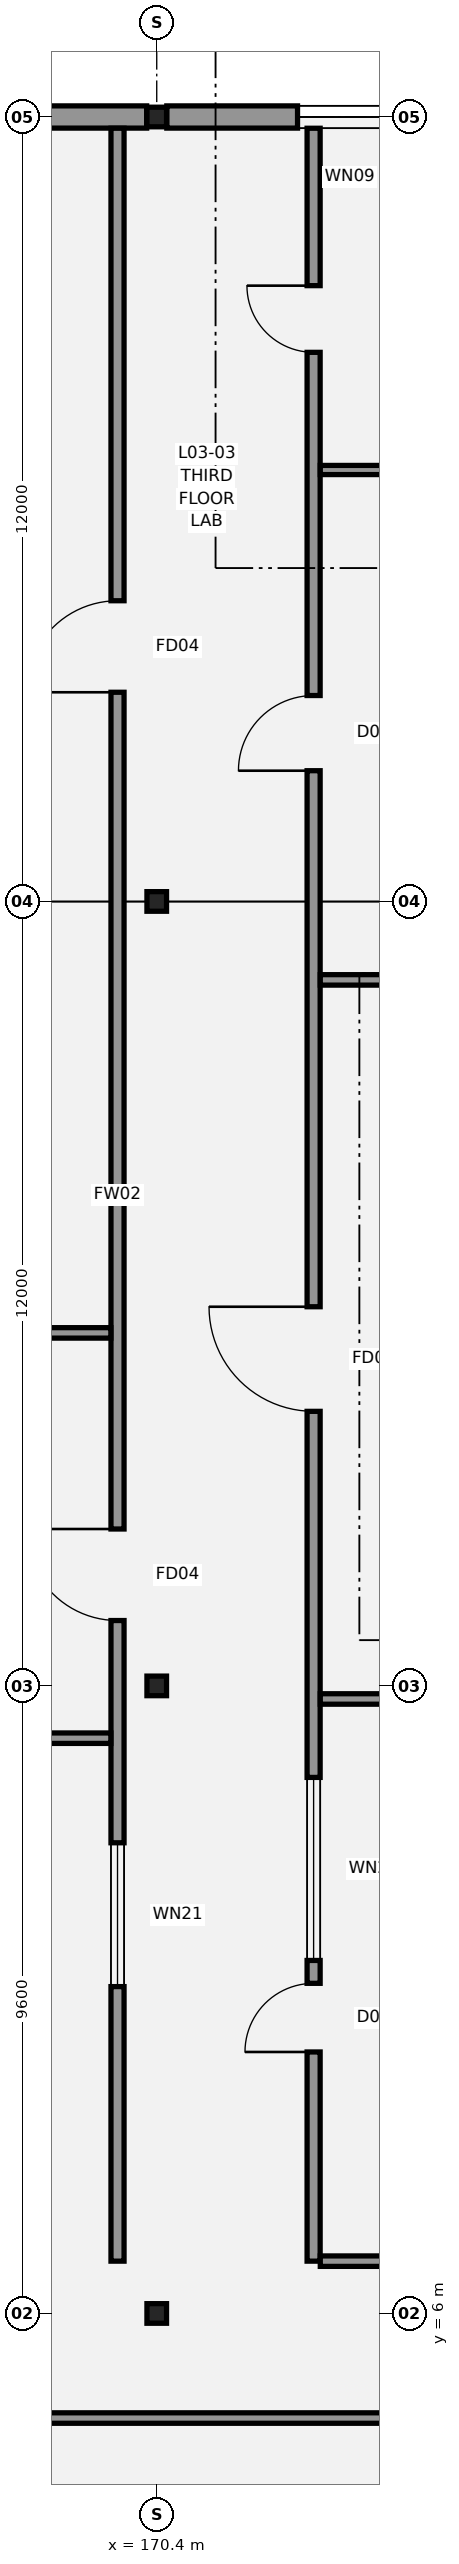
"""IFC4 building model, lengths in metres.
Left out: names, types, materials, properties, quantities, classifications, styles, units other than length and angle.
Written with IfcOpenShell. Run it as: python <this file> out.ifc"""

import sys

from ifc_helpers import new_model, si_unit, direction, frame, frame_2d, origin, origin_2d, place, context, subcontext, project, spatial, rectangle, i_section, extrude, element, fill, save


model = new_model("IFC4")
c1 = context("Model", 3, precision=1e-05, world=origin(), true_north=direction((0.0, 1.0)))
c2 = subcontext(c1, "Body", "Model", "MODEL_VIEW")
j1 = project(units=[si_unit("LENGTHUNIT", "METRE"), si_unit("PLANEANGLEUNIT", "RADIAN")], contexts=[c1])
p1 = place(None, origin())
s1 = spatial("IfcSite", under=j1, at=p1, CompositionType="ELEMENT")
p2 = place(p1, origin())
s2 = spatial("IfcBuilding", under=s1, at=p2, CompositionType="ELEMENT")
p3 = place(p2, frame((0.0, 0.0, 14.4)))
s3 = spatial("IfcBuildingStorey", under=s2, at=p3, CompositionType="ELEMENT", Elevation=14.4)
for number, where, z_axis, x_axis in (
    (1, (170.4, 6.0, 0.0), (0.0, 0.0, 1.0), (1.0, 0.0, 0.0)),
    (2, (170.4, 15.6, 0.0), (0.0, 0.0, 1.0), (1.0, 0.0, 0.0)),
    (3, (170.4, 27.6, 0.0), (0.0, 0.0, 1.0), (1.0, 0.0, 0.0)),
    (4, (170.4, 39.6, 0.0), (0.0, 0.0, 1.0), (1.0, 0.0, 0.0)),
):
    element("IfcColumn", number, at=place(p3, frame(where, z_axis=z_axis, x_axis=x_axis)), inside=s3, PredefinedType="COLUMN", context=c2, shape_type="SweptSolid", body=[
        extrude(i_section(OverallWidth=0.3, OverallDepth=0.3, WebThickness=0.011, FlangeThickness=0.019, FilletRadius=0.027, at=origin_2d()), origin(), (0.0, 0.0, 1.0), 4.2),
    ])
p4 = place(p3, frame((159.754, 39.6, 0.0), z_axis=(0.0, 0.0, 1.0), x_axis=(1.0, 0.0, 0.0)))
e5 = element("IfcWall", 5, at=p4, inside=s3, PredefinedType="STANDARD", context=c2, shape_type="SweptSolid", body=[
    extrude(rectangle(XDim=10.492, YDim=0.34, at=frame_2d((5.246, 0.0))), origin(), (0.0, 0.0, 1.0), 3.625),
])
p5 = place(p4, frame((3.4, 0.0, 0.8)))
e6 = element("IfcOpeningElement", 6, at=p5, cuts=e5, PredefinedType="OPENING", context=c2, shape_type="SweptSolid", body=[
    extrude(rectangle(XDim=1.2, YDim=2.0, at=frame_2d((0.6, 1.0))), frame((0.0, 0.18, 0.0), z_axis=(0.0, -1.0, 0.0), x_axis=(1.0, 0.0, 0.0)), (0.0, 0.0, 1.0), 0.36),
])
p6 = place(p3, frame((170.554, 39.6, 0.0), z_axis=(0.0, 0.0, 1.0), x_axis=(1.0, 0.0, 0.0)))
e7 = element("IfcWall", 7, at=p6, inside=s3, PredefinedType="STANDARD", context=c2, shape_type="SweptSolid", body=[
    extrude(rectangle(XDim=10.492, YDim=0.34, at=frame_2d((5.246, 0.0))), origin(), (0.0, 0.0, 1.0), 3.625),
])
p7 = place(p6, frame((2.0, 0.0, 0.8)))
e8 = element("IfcOpeningElement", 8, at=p7, cuts=e7, PredefinedType="OPENING", context=c2, shape_type="SweptSolid", body=[
    extrude(rectangle(XDim=1.6, YDim=2.0, at=frame_2d((0.8, 1.0))), frame((0.0, 0.18, 0.0), z_axis=(0.0, -1.0, 0.0), x_axis=(1.0, 0.0, 0.0)), (0.0, 0.0, 1.0), 0.36),
])
p8 = place(p3, frame((159.682, 4.4, 0.0), z_axis=(0.0, 0.0, 1.0), x_axis=(1.0, 0.0, 0.0)))
e9 = element("IfcWall", 9, at=p8, inside=s3, PredefinedType="PARTITIONING", context=c2, shape_type="SweptSolid", body=[
    extrude(rectangle(XDim=32.126, YDim=0.16, at=frame_2d((16.063, 0.0))), origin(), (0.0, 0.0, 1.0), 3.84),
])
p9 = place(p8, frame((16.0, 0.0, 0.0)))
e10 = element("IfcOpeningElement", 10, at=p9, cuts=e9, PredefinedType="OPENING", context=c2, shape_type="SweptSolid", body=[
    extrude(rectangle(XDim=1.15, YDim=2.15, at=frame_2d((0.575, 1.075))), frame((0.0, 0.09, 0.0), z_axis=(0.0, -1.0, 0.0), x_axis=(1.0, 0.0, 0.0)), (0.0, 0.0, 1.0), 0.18),
])
p10 = place(p3, frame((169.8, 6.8, 0.0), z_axis=(0.0, 0.0, 1.0), x_axis=(0.0, 1.0, 0.0)))
e11 = element("IfcWall", 11, at=p10, inside=s3, PredefinedType="PARTITIONING", context=c2, shape_type="SweptSolid", body=[
    extrude(rectangle(XDim=32.628, YDim=0.2, at=frame_2d((16.314, 0.0))), origin(), (0.0, 0.0, 1.0), 3.84),
])
p11 = place(p10, frame((9.8, 0.0, 0.0)))
e12 = element("IfcOpeningElement", 12, at=p11, cuts=e11, PredefinedType="OPENING", context=c2, shape_type="SweptSolid", body=[
    extrude(rectangle(XDim=1.4, YDim=2.2, at=frame_2d((0.7, 1.1))), frame((0.0, 0.11, 0.0), z_axis=(0.0, -1.0, 0.0), x_axis=(1.0, 0.0, 0.0)), (0.0, 0.0, 1.0), 0.22),
])
p12 = place(p10, frame((24.0, 0.0, 0.0)))
e13 = element("IfcOpeningElement", 13, at=p12, cuts=e11, PredefinedType="OPENING", context=c2, shape_type="SweptSolid", body=[
    extrude(rectangle(XDim=1.4, YDim=2.2, at=frame_2d((0.7, 1.1))), frame((0.0, 0.11, 0.0), z_axis=(0.0, -1.0, 0.0), x_axis=(1.0, 0.0, 0.0)), (0.0, 0.0, 1.0), 0.22),
])
p13 = place(p10, frame((4.2, 0.0, 1.05)))
e14 = element("IfcOpeningElement", 14, at=p13, cuts=e11, PredefinedType="OPENING", context=c2, shape_type="SweptSolid", body=[
    extrude(rectangle(XDim=2.2, YDim=1.3, at=frame_2d((1.1, 0.65))), frame((0.0, 0.11, 0.0), z_axis=(0.0, -1.0, 0.0), x_axis=(1.0, 0.0, 0.0)), (0.0, 0.0, 1.0), 0.22),
])
p14 = place(p3, frame((165.552, 14.8, 0.0), z_axis=(0.0, 0.0, 1.0), x_axis=(1.0, 0.0, 0.0)))
e15 = element("IfcWall", 15, at=p14, inside=s3, PredefinedType="PARTITIONING", context=c2, shape_type="SweptSolid", body=[
    extrude(rectangle(XDim=4.146, YDim=0.16, at=frame_2d((2.073, 0.0))), origin(), (0.0, 0.0, 1.0), 3.84),
])
p15 = place(p3, frame((159.772, 21.0, 0.0), z_axis=(0.0, 0.0, 1.0), x_axis=(1.0, 0.0, 0.0)))
e16 = element("IfcWall", 16, at=p15, inside=s3, PredefinedType="PARTITIONING", context=c2, shape_type="SweptSolid", body=[
    extrude(rectangle(XDim=9.926, YDim=0.16, at=frame_2d((4.963, 0.0))), origin(), (0.0, 0.0, 1.0), 3.84),
])
p16 = place(p3, frame((172.8, 6.8, 0.0), z_axis=(0.0, 0.0, 1.0), x_axis=(0.0, 1.0, 0.0)))
e17 = element("IfcWall", 17, at=p16, inside=s3, PredefinedType="PARTITIONING", context=c2, shape_type="SweptSolid", body=[
    extrude(rectangle(XDim=32.628, YDim=0.2, at=frame_2d((16.314, 0.0))), origin(), (0.0, 0.0, 1.0), 3.84),
])
p17 = place(p16, frame((3.2, 0.0, 0.0)))
e18 = element("IfcOpeningElement", 18, at=p17, cuts=e17, PredefinedType="OPENING", context=c2, shape_type="SweptSolid", body=[
    extrude(rectangle(XDim=1.05, YDim=2.15, at=frame_2d((0.525, 1.075))), frame((0.0, 0.11, 0.0), z_axis=(0.0, -1.0, 0.0), x_axis=(1.0, 0.0, 0.0)), (0.0, 0.0, 1.0), 0.22),
])
p18 = place(p16, frame((13.0, 0.0, 0.0)))
e19 = element("IfcOpeningElement", 19, at=p18, cuts=e17, PredefinedType="OPENING", context=c2, shape_type="SweptSolid", body=[
    extrude(rectangle(XDim=1.6, YDim=2.2, at=frame_2d((0.8, 1.1))), frame((0.0, 0.11, 0.0), z_axis=(0.0, -1.0, 0.0), x_axis=(1.0, 0.0, 0.0)), (0.0, 0.0, 1.0), 0.22),
])
p19 = place(p16, frame((22.8, 0.0, 0.0)))
e20 = element("IfcOpeningElement", 20, at=p19, cuts=e17, PredefinedType="OPENING", context=c2, shape_type="SweptSolid", body=[
    extrude(rectangle(XDim=1.15, YDim=2.15, at=frame_2d((0.575, 1.075))), frame((0.0, 0.11, 0.0), z_axis=(0.0, -1.0, 0.0), x_axis=(1.0, 0.0, 0.0)), (0.0, 0.0, 1.0), 0.22),
])
p20 = place(p16, frame((29.2, 0.0, 0.0)))
e21 = element("IfcOpeningElement", 21, at=p20, cuts=e17, PredefinedType="OPENING", context=c2, shape_type="SweptSolid", body=[
    extrude(rectangle(XDim=1.02, YDim=2.12, at=frame_2d((0.51, 1.06))), frame((0.0, 0.11, 0.0), z_axis=(0.0, -1.0, 0.0), x_axis=(1.0, 0.0, 0.0)), (0.0, 0.0, 1.0), 0.22),
])
p21 = place(p16, frame((4.6, 0.0, 1.05)))
e22 = element("IfcOpeningElement", 22, at=p21, cuts=e17, PredefinedType="OPENING", context=c2, shape_type="SweptSolid", body=[
    extrude(rectangle(XDim=2.8, YDim=1.3, at=frame_2d((1.4, 0.65))), frame((0.0, 0.11, 0.0), z_axis=(0.0, -1.0, 0.0), x_axis=(1.0, 0.0, 0.0)), (0.0, 0.0, 1.0), 0.22),
])
p22 = place(p3, frame((172.902, 6.8, 0.0), z_axis=(0.0, 0.0, 1.0), x_axis=(1.0, 0.0, 0.0)))
e23 = element("IfcWall", 23, at=p22, inside=s3, PredefinedType="PARTITIONING", context=c2, shape_type="SweptSolid", body=[
    extrude(rectangle(XDim=10.346, YDim=0.16, at=frame_2d((5.173, 0.0))), origin(), (0.0, 0.0, 1.0), 3.84),
])
p23 = place(p3, frame((172.902, 15.4, 0.0), z_axis=(0.0, 0.0, 1.0), x_axis=(1.0, 0.0, 0.0)))
e24 = element("IfcWall", 24, at=p23, inside=s3, PredefinedType="PARTITIONING", context=c2, shape_type="SweptSolid", body=[
    extrude(rectangle(XDim=18.798, YDim=0.16, at=frame_2d((9.399, 0.0))), origin(), (0.0, 0.0, 1.0), 3.535),
])
p24 = place(p3, frame((172.902, 26.4, 0.0), z_axis=(0.0, 0.0, 1.0), x_axis=(1.0, 0.0, 0.0)))
e25 = element("IfcWall", 25, at=p24, inside=s3, PredefinedType="PARTITIONING", context=c2, shape_type="SweptSolid", body=[
    extrude(rectangle(XDim=18.906, YDim=0.16, at=frame_2d((9.453, 0.0))), origin(), (0.0, 0.0, 1.0), 3.84),
])
p25 = place(p3, frame((172.902, 34.2, 0.0), z_axis=(0.0, 0.0, 1.0), x_axis=(1.0, 0.0, 0.0)))
e26 = element("IfcWall", 26, at=p25, inside=s3, PredefinedType="PARTITIONING", context=c2, shape_type="SweptSolid", body=[
    extrude(rectangle(XDim=18.906, YDim=0.14, at=frame_2d((9.453, 0.0))), origin(), (0.0, 0.0, 1.0), 3.84),
])
p26 = place(p25, frame((10.0, 0.0, 0.0)))
e27 = element("IfcOpeningElement", 27, at=p26, cuts=e26, PredefinedType="OPENING", context=c2, shape_type="SweptSolid", body=[
    extrude(rectangle(XDim=0.95, YDim=2.1, at=frame_2d((0.475, 1.05))), frame((0.0, 0.08, 0.0), z_axis=(0.0, -1.0, 0.0), x_axis=(1.0, 0.0, 0.0)), (0.0, 0.0, 1.0), 0.16),
])
p27 = place(p7, origin())
e28 = element("IfcWindow", 28, at=p27, inside=s3, PartitioningType="SINGLE_PANEL", PredefinedType="WINDOW", context=c2, shape_type="SweptSolid", body=[
    extrude(rectangle(XDim=1.6, YDim=2.0, at=frame_2d((0.8, 1.0))), frame((0.0, 0.03, 0.0), z_axis=(0.0, -1.0, 0.0), x_axis=(1.0, 0.0, 0.0)), (0.0, 0.0, 1.0), 0.06),
])
fill(e8, e28)
p28 = place(p11, origin())
e29 = element("IfcDoor", 29, at=p28, inside=s3, OperationType="SINGLE_SWING_RIGHT", PredefinedType="DOOR", context=c2, shape_type="SweptSolid", body=[
    extrude(rectangle(XDim=1.4, YDim=2.2, at=frame_2d((0.7, 1.1))), frame((0.0, 0.025, 0.0), z_axis=(0.0, -1.0, 0.0), x_axis=(1.0, 0.0, 0.0)), (0.0, 0.0, 1.0), 0.05),
])
fill(e12, e29)
p29 = place(p12, origin())
e30 = element("IfcDoor", 30, at=p29, inside=s3, OperationType="SINGLE_SWING_LEFT", PredefinedType="DOOR", context=c2, shape_type="SweptSolid", body=[
    extrude(rectangle(XDim=1.4, YDim=2.2, at=frame_2d((0.7, 1.1))), frame((0.0, 0.025, 0.0), z_axis=(0.0, -1.0, 0.0), x_axis=(1.0, 0.0, 0.0)), (0.0, 0.0, 1.0), 0.05),
])
fill(e13, e30)
p30 = place(p17, origin())
e31 = element("IfcDoor", 31, at=p30, inside=s3, OperationType="SINGLE_SWING_LEFT", PredefinedType="DOOR", context=c2, shape_type="SweptSolid", body=[
    extrude(rectangle(XDim=1.05, YDim=2.15, at=frame_2d((0.525, 1.075))), frame((0.0, 0.025, 0.0), z_axis=(0.0, -1.0, 0.0), x_axis=(1.0, 0.0, 0.0)), (0.0, 0.0, 1.0), 0.05),
])
fill(e18, e31)
p31 = place(p18, origin())
e32 = element("IfcDoor", 32, at=p31, inside=s3, OperationType="SINGLE_SWING_RIGHT", PredefinedType="DOOR", context=c2, shape_type="SweptSolid", body=[
    extrude(rectangle(XDim=1.6, YDim=2.2, at=frame_2d((0.8, 1.1))), frame((0.0, 0.025, 0.0), z_axis=(0.0, -1.0, 0.0), x_axis=(1.0, 0.0, 0.0)), (0.0, 0.0, 1.0), 0.05),
])
fill(e19, e32)
p32 = place(p19, origin())
e33 = element("IfcDoor", 33, at=p32, inside=s3, OperationType="SINGLE_SWING_LEFT", PredefinedType="DOOR", context=c2, shape_type="SweptSolid", body=[
    extrude(rectangle(XDim=1.15, YDim=2.15, at=frame_2d((0.575, 1.075))), frame((0.0, 0.025, 0.0), z_axis=(0.0, -1.0, 0.0), x_axis=(1.0, 0.0, 0.0)), (0.0, 0.0, 1.0), 0.05),
])
fill(e20, e33)
p33 = place(p20, origin())
e34 = element("IfcDoor", 34, at=p33, inside=s3, OperationType="SINGLE_SWING_RIGHT", PredefinedType="DOOR", context=c2, shape_type="SweptSolid", body=[
    extrude(rectangle(XDim=1.02, YDim=2.12, at=frame_2d((0.51, 1.06))), frame((0.0, 0.025, 0.0), z_axis=(0.0, -1.0, 0.0), x_axis=(1.0, 0.0, 0.0)), (0.0, 0.0, 1.0), 0.05),
])
fill(e21, e34)
p34 = place(p13, origin())
e35 = element("IfcWindow", 35, at=p34, inside=s3, PartitioningType="SINGLE_PANEL", PredefinedType="WINDOW", context=c2, shape_type="SweptSolid", body=[
    extrude(rectangle(XDim=2.2, YDim=1.3, at=frame_2d((1.1, 0.65))), frame((0.0, 0.03, 0.0), z_axis=(0.0, -1.0, 0.0), x_axis=(1.0, 0.0, 0.0)), (0.0, 0.0, 1.0), 0.06),
])
fill(e14, e35)
p35 = place(p21, origin())
e36 = element("IfcWindow", 36, at=p35, inside=s3, PartitioningType="SINGLE_PANEL", PredefinedType="WINDOW", context=c2, shape_type="SweptSolid", body=[
    extrude(rectangle(XDim=2.8, YDim=1.3, at=frame_2d((1.4, 0.65))), frame((0.0, 0.03, 0.0), z_axis=(0.0, -1.0, 0.0), x_axis=(1.0, 0.0, 0.0)), (0.0, 0.0, 1.0), 0.06),
])
fill(e22, e36)
save(model, sys.argv[1])
